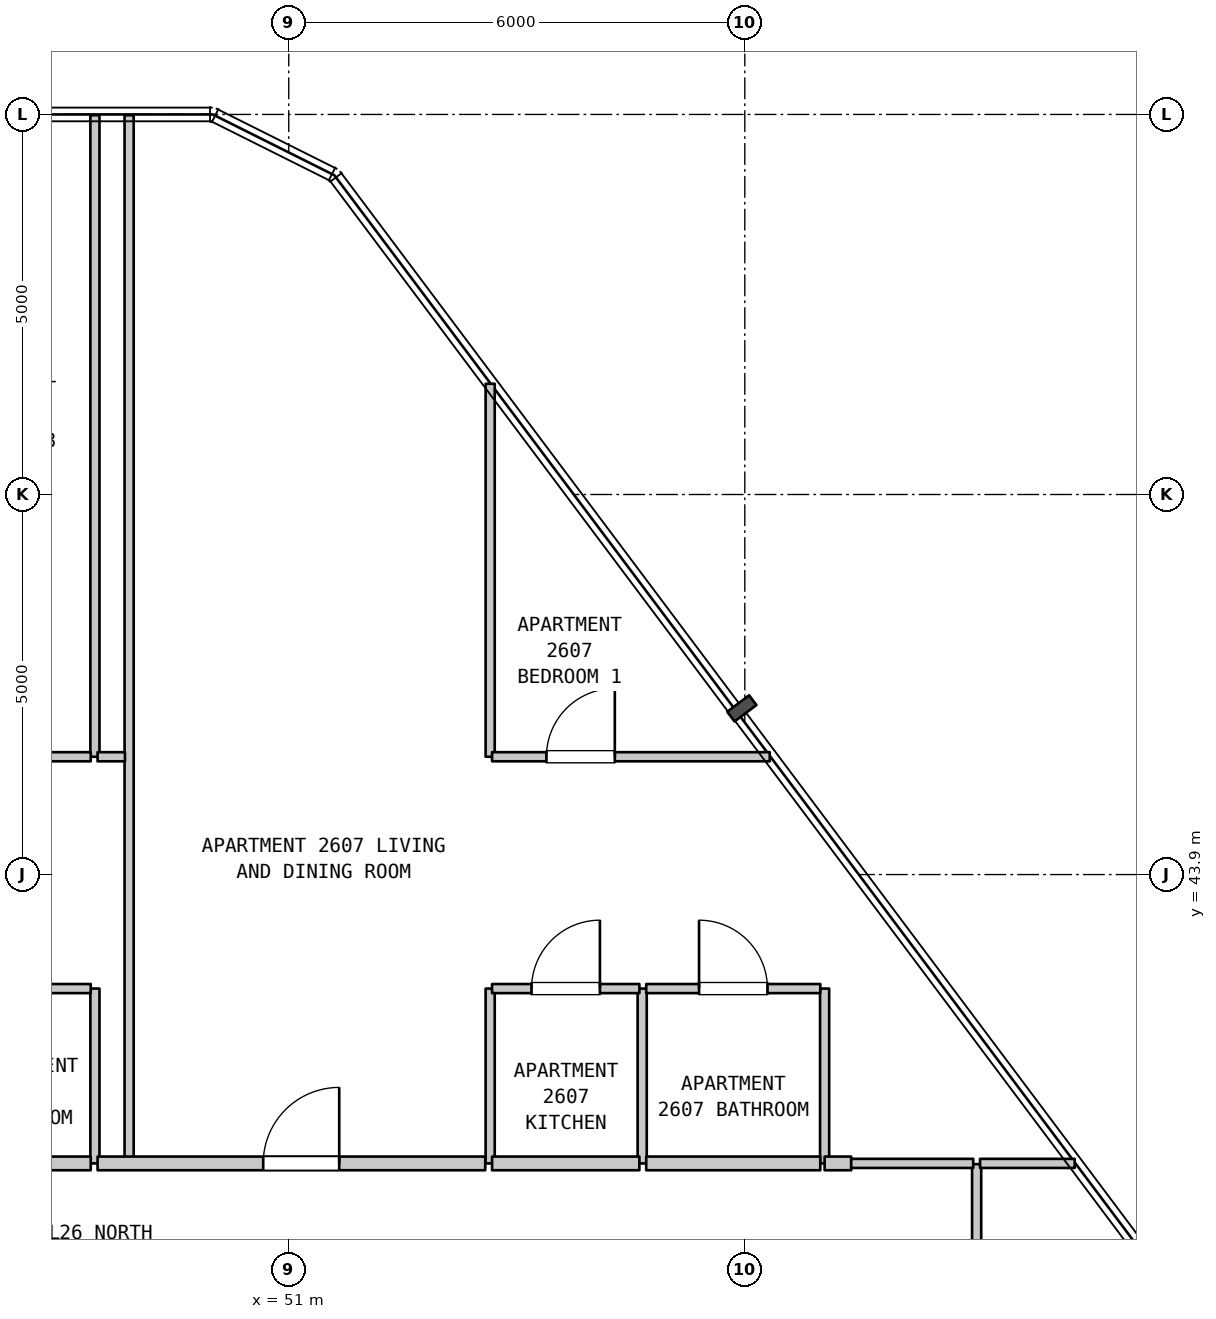
"""IFC4 building model, lengths in metres.
Left out: names, types, materials, properties, quantities, classifications, styles, units other than length and angle.
Written with IfcOpenShell. Run it as: python <this file> out.ifc"""

import sys

from ifc_helpers import new_model, si_unit, direction, frame, frame_2d, origin, place, context, subcontext, project, spatial, rectangle, extrude, element, fill, save


model = new_model("IFC4")
c1 = context("Model", 3, precision=1e-05, world=origin(), true_north=direction((0.0, 1.0)))
c2 = subcontext(c1, "Body", "Model", "MODEL_VIEW")
j1 = project(units=[si_unit("LENGTHUNIT", "METRE"), si_unit("PLANEANGLEUNIT", "RADIAN")], contexts=[c1])
p1 = place(None, origin())
s1 = spatial("IfcSite", under=j1, at=p1, CompositionType="ELEMENT")
p2 = place(p1, origin())
s2 = spatial("IfcBuilding", under=s1, at=p2, CompositionType="ELEMENT")
p3 = place(p2, frame((0.0, 0.0, 109.4)))
s3 = spatial("IfcBuildingStorey", under=s2, at=p3, CompositionType="ELEMENT", Elevation=109.4)
p4 = place(p3, frame((48.45, 40.1, 0.0), z_axis=(0.0, 0.0, 1.0), x_axis=(0.0, 1.0, 0.0)))
e1 = element("IfcWall", 1, at=p4, inside=s3, PredefinedType="PARTITIONING", context=c2, shape_type="SweptSolid", body=[
    extrude(rectangle(XDim=2.3, YDim=0.12, at=frame_2d((1.15, 0.0))), origin(), (0.0, 0.0, 1.0), 3.385),
])
p5 = place(p3, frame((48.45, 45.45, 0.0), z_axis=(0.0, 0.0, 1.0), x_axis=(0.0, 1.0, 0.0)))
e2 = element("IfcWall", 2, at=p5, inside=s3, PredefinedType="PARTITIONING", context=c2, shape_type="SweptSolid", body=[
    extrude(rectangle(XDim=8.44, YDim=0.12, at=frame_2d((4.22, 0.0))), origin(), (0.0, 0.0, 1.0), 3.385),
])
p6 = place(p3, frame((48.9, 40.1, 0.0), z_axis=(0.0, 0.0, 1.0), x_axis=(0.0, 1.0, 0.0)))
e3 = element("IfcWall", 3, at=p6, inside=s3, PredefinedType="PARTITIONING", context=c2, shape_type="SweptSolid", body=[
    extrude(rectangle(XDim=13.79, YDim=0.12, at=frame_2d((6.895, 0.0))), origin(), (0.0, 0.0, 1.0), 3.385),
])
p7 = place(p3, frame((53.65, 40.1, 0.0), z_axis=(0.0, 0.0, 1.0), x_axis=(0.0, 1.0, 0.0)))
e4 = element("IfcWall", 4, at=p7, inside=s3, PredefinedType="PARTITIONING", context=c2, shape_type="SweptSolid", body=[
    extrude(rectangle(XDim=2.3, YDim=0.12, at=frame_2d((1.15, 0.0))), origin(), (0.0, 0.0, 1.0), 3.385),
])
p8 = place(p3, frame((53.65, 45.45, 0.0), z_axis=(0.0, 0.0, 1.0), x_axis=(0.0, 1.0, 0.0)))
e5 = element("IfcWall", 5, at=p8, inside=s3, PredefinedType="PARTITIONING", context=c2, shape_type="SweptSolid", body=[
    extrude(rectangle(XDim=4.907, YDim=0.12, at=frame_2d((2.454, 0.0))), origin(), (0.0, 0.0, 1.0), 3.385),
])
for number, where, z_axis, x_axis in (
    (6, (55.65, 40.1, 0.0), (0.0, 0.0, 1.0), (0.0, 1.0, 0.0)),
    (7, (58.05, 40.1, 0.0), (0.0, 0.0, 1.0), (0.0, 1.0, 0.0)),
):
    element("IfcWall", number, at=place(p3, frame(where, z_axis=z_axis, x_axis=x_axis)), inside=s3, PredefinedType="PARTITIONING", context=c2, shape_type="SweptSolid", body=[
        extrude(rectangle(XDim=2.3, YDim=0.12, at=frame_2d((1.15, 0.0))), origin(), (0.0, 0.0, 1.0), 3.385),
    ])
p9 = place(p3, frame((60.05, 37.89, 0.0), z_axis=(0.0, 0.0, 1.0), x_axis=(0.0, 1.0, 0.0)))
e8 = element("IfcWall", 8, at=p9, inside=s3, PredefinedType="PARTITIONING", context=c2, shape_type="SweptSolid", body=[
    extrude(rectangle(XDim=2.2, YDim=0.12, at=frame_2d((1.1, 0.0))), origin(), (0.0, 0.0, 1.0), 3.385),
])
p10 = place(p3, frame((44.635, 40.1, 0.0), z_axis=(0.0, 0.0, 1.0), x_axis=(1.0, 0.0, 0.0)))
e9 = element("IfcWall", 9, at=p10, inside=s3, PredefinedType="STANDARD", context=c2, shape_type="SweptSolid", body=[
    extrude(rectangle(XDim=3.76, YDim=0.18, at=frame_2d((1.88, 0.0))), origin(), (0.0, 0.0, 1.0), 3.385),
])
p11 = place(p3, frame((48.485, 40.1, 0.0), z_axis=(0.0, 0.0, 1.0), x_axis=(1.0, 0.0, 0.0)))
e10 = element("IfcWall", 10, at=p11, inside=s3, PredefinedType="STANDARD", context=c2, shape_type="SweptSolid", body=[
    extrude(rectangle(XDim=5.1, YDim=0.18, at=frame_2d((2.55, 0.0))), origin(), (0.0, 0.0, 1.0), 3.385),
])
p12 = place(p11, frame((2.179, 0.0, 0.0)))
e11 = element("IfcOpeningElement", 11, at=p12, cuts=e10, PredefinedType="OPENING", context=c2, shape_type="SweptSolid", body=[
    extrude(rectangle(XDim=1.0, YDim=2.15, at=frame_2d((0.5, 1.075))), frame((0.0, 0.1, 0.0), z_axis=(0.0, -1.0, 0.0), x_axis=(1.0, 0.0, 0.0)), (0.0, 0.0, 1.0), 0.2),
])
p13 = place(p3, frame((53.675, 40.1, 0.0), z_axis=(0.0, 0.0, 1.0), x_axis=(1.0, 0.0, 0.0)))
e12 = element("IfcWall", 12, at=p13, inside=s3, PredefinedType="STANDARD", context=c2, shape_type="SweptSolid", body=[
    extrude(rectangle(XDim=1.938, YDim=0.18, at=frame_2d((0.969, 0.0))), origin(), (0.0, 0.0, 1.0), 3.385),
])
p14 = place(p3, frame((55.703, 40.1, 0.0), z_axis=(0.0, 0.0, 1.0), x_axis=(1.0, 0.0, 0.0)))
e13 = element("IfcWall", 13, at=p14, inside=s3, PredefinedType="STANDARD", context=c2, shape_type="SweptSolid", body=[
    extrude(rectangle(XDim=2.29, YDim=0.18, at=frame_2d((1.145, 0.0))), origin(), (0.0, 0.0, 1.0), 3.385),
])
p15 = place(p3, frame((58.05, 40.1, 0.0), z_axis=(0.0, 0.0, 1.0), x_axis=(1.0, 0.0, 0.0)))
e14 = element("IfcWall", 14, at=p15, inside=s3, PredefinedType="STANDARD", context=c2, shape_type="SweptSolid", body=[
    extrude(rectangle(XDim=0.35, YDim=0.18, at=frame_2d((0.175, 0.0))), origin(), (0.0, 0.0, 1.0), 3.385),
])
p16 = place(p3, frame((58.4, 40.1, 0.0), z_axis=(0.0, 0.0, 1.0), x_axis=(1.0, 0.0, 0.0)))
e15 = element("IfcWall", 15, at=p16, inside=s3, PredefinedType="PARTITIONING", context=c2, shape_type="SweptSolid", body=[
    extrude(rectangle(XDim=1.605, YDim=0.12, at=frame_2d((0.802, 0.0))), origin(), (0.0, 0.0, 1.0), 3.385),
])
p17 = place(p3, frame((60.095, 40.1, 0.0), z_axis=(0.0, 0.0, 1.0), x_axis=(1.0, 0.0, 0.0)))
e16 = element("IfcWall", 16, at=p17, inside=s3, PredefinedType="PARTITIONING", context=c2, shape_type="SweptSolid", body=[
    extrude(rectangle(XDim=1.245, YDim=0.12, at=frame_2d((0.623, 0.0))), origin(), (0.0, 0.0, 1.0), 3.385),
])
p18 = place(p3, frame((44.635, 42.4, 0.0), z_axis=(0.0, 0.0, 1.0), x_axis=(1.0, 0.0, 0.0)))
e17 = element("IfcWall", 17, at=p18, inside=s3, PredefinedType="PARTITIONING", context=c2, shape_type="SweptSolid", body=[
    extrude(rectangle(XDim=3.76, YDim=0.12, at=frame_2d((1.88, 0.0))), origin(), (0.0, 0.0, 1.0), 3.385),
])
p19 = place(p18, frame((1.358, 0.0, 0.0)))
e18 = element("IfcOpeningElement", 18, at=p19, cuts=e17, PredefinedType="OPENING", context=c2, shape_type="SweptSolid", body=[
    extrude(rectangle(XDim=0.9, YDim=2.1, at=frame_2d((0.45, 1.05))), frame((0.0, 0.07, 0.0), z_axis=(0.0, -1.0, 0.0), x_axis=(1.0, 0.0, 0.0)), (0.0, 0.0, 1.0), 0.14),
])
p20 = place(p3, frame((53.675, 42.4, 0.0), z_axis=(0.0, 0.0, 1.0), x_axis=(1.0, 0.0, 0.0)))
e19 = element("IfcWall", 19, at=p20, inside=s3, PredefinedType="PARTITIONING", context=c2, shape_type="SweptSolid", body=[
    extrude(rectangle(XDim=1.938, YDim=0.12, at=frame_2d((0.969, 0.0))), origin(), (0.0, 0.0, 1.0), 3.385),
])
p21 = place(p20, frame((0.519, 0.0, 0.0)))
e20 = element("IfcOpeningElement", 20, at=p21, cuts=e19, PredefinedType="OPENING", context=c2, shape_type="SweptSolid", body=[
    extrude(rectangle(XDim=0.9, YDim=2.15, at=frame_2d((0.45, 1.075))), frame((0.0, 0.07, 0.0), z_axis=(0.0, -1.0, 0.0), x_axis=(1.0, 0.0, 0.0)), (0.0, 0.0, 1.0), 0.14),
])
p22 = place(p3, frame((55.703, 42.4, 0.0), z_axis=(0.0, 0.0, 1.0), x_axis=(1.0, 0.0, 0.0)))
e21 = element("IfcWall", 21, at=p22, inside=s3, PredefinedType="PARTITIONING", context=c2, shape_type="SweptSolid", body=[
    extrude(rectangle(XDim=2.29, YDim=0.12, at=frame_2d((1.145, 0.0))), origin(), (0.0, 0.0, 1.0), 3.385),
])
p23 = place(p22, frame((0.695, 0.0, 0.0)))
e22 = element("IfcOpeningElement", 22, at=p23, cuts=e21, PredefinedType="OPENING", context=c2, shape_type="SweptSolid", body=[
    extrude(rectangle(XDim=0.9, YDim=2.1, at=frame_2d((0.45, 1.05))), frame((0.0, 0.07, 0.0), z_axis=(0.0, -1.0, 0.0), x_axis=(1.0, 0.0, 0.0)), (0.0, 0.0, 1.0), 0.14),
])
p24 = place(p3, frame((41.355, 45.45, 0.0), z_axis=(0.0, 0.0, 1.0), x_axis=(1.0, 0.0, 0.0)))
e23 = element("IfcWall", 23, at=p24, inside=s3, PredefinedType="PARTITIONING", context=c2, shape_type="SweptSolid", body=[
    extrude(rectangle(XDim=7.04, YDim=0.12, at=frame_2d((3.52, 0.0))), origin(), (0.0, 0.0, 1.0), 3.385),
])
p25 = place(p24, frame((0.868, 0.0, 0.0)))
e24 = element("IfcOpeningElement", 24, at=p25, cuts=e23, PredefinedType="OPENING", context=c2, shape_type="SweptSolid", body=[
    extrude(rectangle(XDim=0.9, YDim=2.15, at=frame_2d((0.45, 1.075))), frame((0.0, 0.07, 0.0), z_axis=(0.0, -1.0, 0.0), x_axis=(1.0, 0.0, 0.0)), (0.0, 0.0, 1.0), 0.14),
])
p26 = place(p24, frame((2.999, 0.0, 0.0)))
e25 = element("IfcOpeningElement", 25, at=p26, cuts=e23, PredefinedType="OPENING", context=c2, shape_type="SweptSolid", body=[
    extrude(rectangle(XDim=0.9, YDim=2.15, at=frame_2d((0.45, 1.075))), frame((0.0, 0.07, 0.0), z_axis=(0.0, -1.0, 0.0), x_axis=(1.0, 0.0, 0.0)), (0.0, 0.0, 1.0), 0.14),
])
p27 = place(p24, frame((5.272, 0.0, 0.0)))
e26 = element("IfcOpeningElement", 26, at=p27, cuts=e23, PredefinedType="OPENING", context=c2, shape_type="SweptSolid", body=[
    extrude(rectangle(XDim=0.9, YDim=2.15, at=frame_2d((0.45, 1.075))), frame((0.0, 0.07, 0.0), z_axis=(0.0, -1.0, 0.0), x_axis=(1.0, 0.0, 0.0)), (0.0, 0.0, 1.0), 0.14),
])
p28 = place(p3, frame((48.485, 45.45, 0.0), z_axis=(0.0, 0.0, 1.0), x_axis=(1.0, 0.0, 0.0)))
e27 = element("IfcWall", 27, at=p28, inside=s3, PredefinedType="PARTITIONING", context=c2, shape_type="SweptSolid", body=[
    extrude(rectangle(XDim=0.36, YDim=0.12, at=frame_2d((0.18, 0.0))), origin(), (0.0, 0.0, 1.0), 3.385),
])
p29 = place(p3, frame((53.675, 45.45, 0.0), z_axis=(0.0, 0.0, 1.0), x_axis=(1.0, 0.0, 0.0)))
e28 = element("IfcWall", 28, at=p29, inside=s3, PredefinedType="PARTITIONING", context=c2, shape_type="SweptSolid", body=[
    extrude(rectangle(XDim=3.653, YDim=0.12, at=frame_2d((1.826, 0.0))), origin(), (0.0, 0.0, 1.0), 3.385),
])
p30 = place(p29, frame((0.715, 0.0, 0.0)))
e29 = element("IfcOpeningElement", 29, at=p30, cuts=e28, PredefinedType="OPENING", context=c2, shape_type="SweptSolid", body=[
    extrude(rectangle(XDim=0.9, YDim=2.15, at=frame_2d((0.45, 1.075))), frame((0.0, 0.07, 0.0), z_axis=(0.0, -1.0, 0.0), x_axis=(1.0, 0.0, 0.0)), (0.0, 0.0, 1.0), 0.14),
])
p31 = place(p12, origin())
e30 = element("IfcDoor", 30, at=p31, inside=s3, OperationType="SINGLE_SWING_RIGHT", PredefinedType="DOOR", context=c2, shape_type="SweptSolid", body=[
    extrude(rectangle(XDim=1.0, YDim=2.15, at=frame_2d((0.5, 1.075))), frame((0.0, 0.025, 0.0), z_axis=(0.0, -1.0, 0.0), x_axis=(1.0, 0.0, 0.0)), (0.0, 0.0, 1.0), 0.05),
])
fill(e11, e30)
p32 = place(p21, origin())
e31 = element("IfcDoor", 31, at=p32, inside=s3, OperationType="SINGLE_SWING_RIGHT", PredefinedType="DOOR", context=c2, shape_type="SweptSolid", body=[
    extrude(rectangle(XDim=0.9, YDim=2.15, at=frame_2d((0.45, 1.075))), frame((0.0, 0.025, 0.0), z_axis=(0.0, -1.0, 0.0), x_axis=(1.0, 0.0, 0.0)), (0.0, 0.0, 1.0), 0.05),
])
fill(e20, e31)
p33 = place(p23, origin())
e32 = element("IfcDoor", 32, at=p33, inside=s3, OperationType="SINGLE_SWING_LEFT", PredefinedType="DOOR", context=c2, shape_type="SweptSolid", body=[
    extrude(rectangle(XDim=0.9, YDim=2.1, at=frame_2d((0.45, 1.05))), frame((0.0, 0.025, 0.0), z_axis=(0.0, -1.0, 0.0), x_axis=(1.0, 0.0, 0.0)), (0.0, 0.0, 1.0), 0.05),
])
fill(e22, e32)
p34 = place(p30, origin())
e33 = element("IfcDoor", 33, at=p34, inside=s3, OperationType="SINGLE_SWING_RIGHT", PredefinedType="DOOR", context=c2, shape_type="SweptSolid", body=[
    extrude(rectangle(XDim=0.9, YDim=2.15, at=frame_2d((0.45, 1.075))), frame((0.0, 0.025, 0.0), z_axis=(0.0, -1.0, 0.0), x_axis=(1.0, 0.0, 0.0)), (0.0, 0.0, 1.0), 0.05),
])
fill(e29, e33)
save(model, sys.argv[1])
